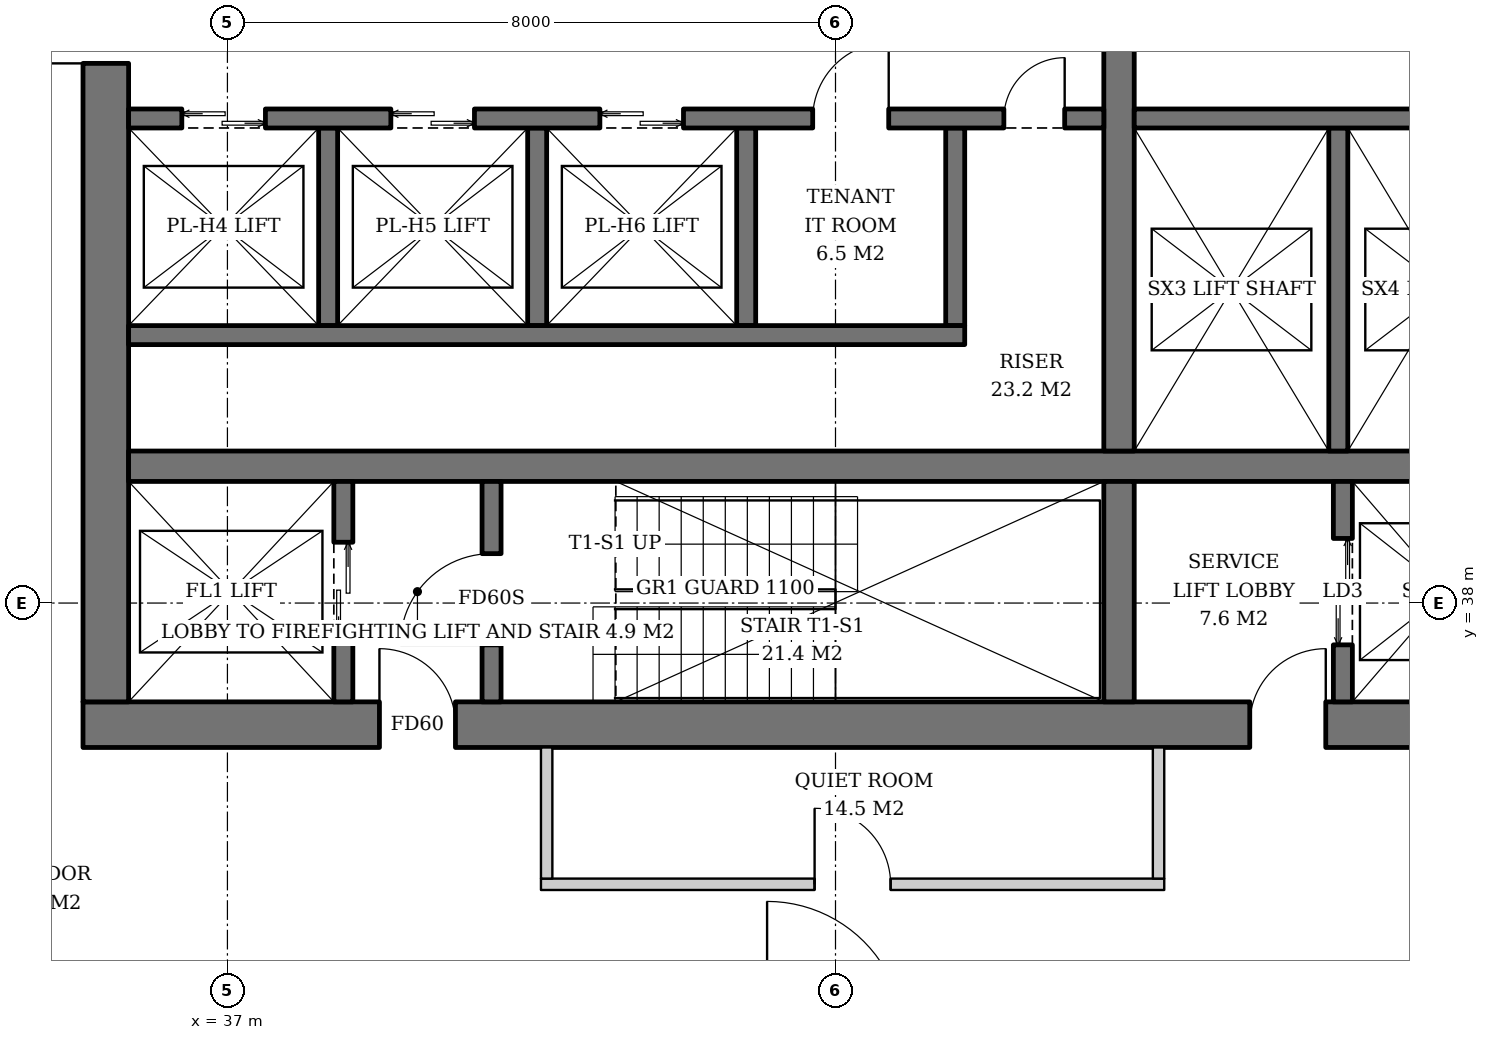
"""IFC4 building model, lengths in metres.
Left out: names, types, materials, properties, quantities, classifications, styles, units other than length and angle.
Written with IfcOpenShell. Run it as: python <this file> out.ifc"""

import sys

from ifc_helpers import new_model, si_unit, direction, frame, frame_2d, origin, place, context, subcontext, project, spatial, rectangle, extrude, element, fill, save


model = new_model("IFC4")
c1 = context("Model", 3, precision=1e-05, world=origin(), true_north=direction((0.0, 1.0)))
c2 = subcontext(c1, "Body", "Model", "MODEL_VIEW")
j1 = project(units=[si_unit("LENGTHUNIT", "METRE"), si_unit("PLANEANGLEUNIT", "RADIAN")], contexts=[c1])
p1 = place(None, origin())
s1 = spatial("IfcSite", under=j1, at=p1, CompositionType="ELEMENT")
p2 = place(p1, origin())
s2 = spatial("IfcBuilding", under=s1, at=p2, CompositionType="ELEMENT")
p3 = place(p2, frame((0.0, 0.0, 222.4)))
s3 = spatial("IfcBuildingStorey", under=s2, at=p3, CompositionType="ELEMENT", Elevation=222.4)
p4 = place(p3, frame((35.1, 36.4, 0.0), z_axis=(0.0, 0.0, 1.0), x_axis=(1.0, 0.0, 0.0)))
e1 = element("IfcWall", 1, at=p4, inside=s3, PredefinedType="SHEAR", context=c2, shape_type="SweptSolid", body=[
    extrude(rectangle(XDim=19.8, YDim=0.6, at=frame_2d((9.9, 0.0))), origin(), (0.0, 0.0, 1.0), 3.8),
])
p5 = place(p4, frame((3.9, 0.0, 0.0)))
e2 = element("IfcOpeningElement", 2, at=p5, cuts=e1, PredefinedType="OPENING", context=c2, shape_type="SweptSolid", body=[
    extrude(rectangle(XDim=1.0, YDim=2.1, at=frame_2d((0.5, 1.05))), frame((0.0, 0.31, 0.0), z_axis=(0.0, -1.0, 0.0), x_axis=(1.0, 0.0, 0.0)), (0.0, 0.0, 1.0), 0.62),
])
p6 = place(p4, frame((15.35, 0.0, 0.0)))
e3 = element("IfcOpeningElement", 3, at=p6, cuts=e1, PredefinedType="OPENING", context=c2, shape_type="SweptSolid", body=[
    extrude(rectangle(XDim=1.0, YDim=2.1, at=frame_2d((0.5, 1.05))), frame((0.0, 0.31, 0.0), z_axis=(0.0, -1.0, 0.0), x_axis=(1.0, 0.0, 0.0)), (0.0, 0.0, 1.0), 0.62),
])
p7 = place(p3, frame((35.4, 36.7, 0.0), z_axis=(0.0, 0.0, 1.0), x_axis=(0.0, 1.0, 0.0)))
e4 = element("IfcWall", 4, at=p7, inside=s3, PredefinedType="SHEAR", context=c2, shape_type="SweptSolid", body=[
    extrude(rectangle(XDim=18.6, YDim=0.6, at=frame_2d((9.3, 0.0))), origin(), (0.0, 0.0, 1.0), 3.8),
])
p8 = place(p7, frame((8.4, 0.0, 0.0)))
e5 = element("IfcOpeningElement", 5, at=p8, cuts=e4, PredefinedType="OPENING", context=c2, shape_type="SweptSolid", body=[
    extrude(rectangle(XDim=1.8, YDim=2.4, at=frame_2d((0.9, 1.2))), frame((0.0, 0.31, 0.0), z_axis=(0.0, -1.0, 0.0), x_axis=(1.0, 0.0, 0.0)), (0.0, 0.0, 1.0), 0.62),
])
p9 = place(p3, frame((35.7, 39.8, 0.0), z_axis=(0.0, 0.0, 1.0), x_axis=(1.0, 0.0, 0.0)))
e6 = element("IfcWall", 6, at=p9, inside=s3, PredefinedType="SHEAR", context=c2, shape_type="SweptSolid", body=[
    extrude(rectangle(XDim=18.6, YDim=0.4, at=frame_2d((9.3, 0.0))), origin(), (0.0, 0.0, 1.0), 3.8),
])
p10 = place(p3, frame((48.73, 36.7, 0.0), z_axis=(0.0, 0.0, 1.0), x_axis=(0.0, 1.0, 0.0)))
e7 = element("IfcWall", 7, at=p10, inside=s3, PredefinedType="SHEAR", context=c2, shape_type="SweptSolid", body=[
    extrude(rectangle(XDim=2.9, YDim=0.4, at=frame_2d((1.45, 0.0))), origin(), (0.0, 0.0, 1.0), 3.8),
])
p11 = place(p3, frame((48.73, 40.0, 0.0), z_axis=(0.0, 0.0, 1.0), x_axis=(0.0, 1.0, 0.0)))
e8 = element("IfcWall", 8, at=p11, inside=s3, PredefinedType="SHEAR", context=c2, shape_type="SweptSolid", body=[
    extrude(rectangle(XDim=12.0, YDim=0.4, at=frame_2d((6.0, 0.0))), origin(), (0.0, 0.0, 1.0), 3.8),
])
p12 = place(p3, frame((38.525, 36.7, 0.0), z_axis=(0.0, 0.0, 1.0), x_axis=(0.0, 1.0, 0.0)))
e9 = element("IfcWall", 9, at=p12, inside=s3, PredefinedType="SHEAR", context=c2, shape_type="SweptSolid", body=[
    extrude(rectangle(XDim=2.9, YDim=0.25, at=frame_2d((1.45, 0.0))), origin(), (0.0, 0.0, 1.0), 3.8),
])
p13 = place(p12, frame((0.8, 0.0, 0.0)))
e10 = element("IfcOpeningElement", 10, at=p13, cuts=e9, PredefinedType="OPENING", context=c2, shape_type="SweptSolid", body=[
    extrude(rectangle(XDim=1.3, YDim=2.2, at=frame_2d((0.65, 1.1))), frame((0.0, 0.135, 0.0), z_axis=(0.0, -1.0, 0.0), x_axis=(1.0, 0.0, 0.0)), (0.0, 0.0, 1.0), 0.27),
])
p14 = place(p3, frame((40.475, 36.7, 0.0), z_axis=(0.0, 0.0, 1.0), x_axis=(0.0, 1.0, 0.0)))
e11 = element("IfcWall", 11, at=p14, inside=s3, PredefinedType="SHEAR", context=c2, shape_type="SweptSolid", body=[
    extrude(rectangle(XDim=2.9, YDim=0.25, at=frame_2d((1.45, 0.0))), origin(), (0.0, 0.0, 1.0), 3.8),
])
p15 = place(p14, frame((0.75, 0.0, 0.0)))
e12 = element("IfcOpeningElement", 12, at=p15, cuts=e11, PredefinedType="OPENING", context=c2, shape_type="SweptSolid", body=[
    extrude(rectangle(XDim=1.2, YDim=2.1, at=frame_2d((0.6, 1.05))), frame((0.0, 0.135, 0.0), z_axis=(0.0, -1.0, 0.0), x_axis=(1.0, 0.0, 0.0)), (0.0, 0.0, 1.0), 0.27),
])
p16 = place(p3, frame((51.675, 36.7, 0.0), z_axis=(0.0, 0.0, 1.0), x_axis=(0.0, 1.0, 0.0)))
e13 = element("IfcWall", 13, at=p16, inside=s3, PredefinedType="SHEAR", context=c2, shape_type="SweptSolid", body=[
    extrude(rectangle(XDim=2.9, YDim=0.25, at=frame_2d((1.45, 0.0))), origin(), (0.0, 0.0, 1.0), 3.8),
])
p17 = place(p16, frame((0.75, 0.0, 0.0)))
e14 = element("IfcOpeningElement", 14, at=p17, cuts=e13, PredefinedType="OPENING", context=c2, shape_type="SweptSolid", body=[
    extrude(rectangle(XDim=1.4, YDim=2.4, at=frame_2d((0.7, 1.2))), frame((0.0, 0.135, 0.0), z_axis=(0.0, -1.0, 0.0), x_axis=(1.0, 0.0, 0.0)), (0.0, 0.0, 1.0), 0.27),
])
for number, where, z_axis, x_axis in (
    (15, (38.325, 44.25, 0.0), (0.0, 0.0, 1.0), (0.0, -1.0, 0.0)),
    (16, (41.075, 44.25, 0.0), (0.0, 0.0, 1.0), (0.0, -1.0, 0.0)),
    (17, (43.825, 44.25, 0.0), (0.0, 0.0, 1.0), (0.0, -1.0, 0.0)),
    (18, (46.575, 44.25, 0.0), (0.0, 0.0, 1.0), (0.0, -1.0, 0.0)),
):
    element("IfcWall", number, at=place(p3, frame(where, z_axis=z_axis, x_axis=x_axis)), inside=s3, PredefinedType="SHEAR", context=c2, shape_type="SweptSolid", body=[
        extrude(rectangle(XDim=2.6, YDim=0.25, at=frame_2d((1.3, 0.0))), origin(), (0.0, 0.0, 1.0), 3.8),
    ])
p18 = place(p3, frame((35.7, 41.525, 0.0), z_axis=(0.0, 0.0, 1.0), x_axis=(1.0, 0.0, 0.0)))
e19 = element("IfcWall", 19, at=p18, inside=s3, PredefinedType="SHEAR", context=c2, shape_type="SweptSolid", body=[
    extrude(rectangle(XDim=11.0, YDim=0.25, at=frame_2d((5.5, 0.0))), origin(), (0.0, 0.0, 1.0), 3.8),
])
p19 = place(p3, frame((35.7, 44.375, 0.0), z_axis=(0.0, 0.0, 1.0), x_axis=(1.0, 0.0, 0.0)))
e20 = element("IfcWall", 20, at=p19, inside=s3, PredefinedType="SHEAR", context=c2, shape_type="SweptSolid", body=[
    extrude(rectangle(XDim=12.83, YDim=0.25, at=frame_2d((6.415, 0.0))), origin(), (0.0, 0.0, 1.0), 3.8),
])
p20 = place(p19, frame((0.7, 0.0, 0.0)))
e21 = element("IfcOpeningElement", 21, at=p20, cuts=e20, PredefinedType="OPENING", context=c2, shape_type="SweptSolid", body=[
    extrude(rectangle(XDim=1.1, YDim=2.2, at=frame_2d((0.55, 1.1))), frame((0.0, 0.135, 0.0), z_axis=(0.0, -1.0, 0.0), x_axis=(1.0, 0.0, 0.0)), (0.0, 0.0, 1.0), 0.27),
])
p21 = place(p19, frame((3.45, 0.0, 0.0)))
e22 = element("IfcOpeningElement", 22, at=p21, cuts=e20, PredefinedType="OPENING", context=c2, shape_type="SweptSolid", body=[
    extrude(rectangle(XDim=1.1, YDim=2.2, at=frame_2d((0.55, 1.1))), frame((0.0, 0.135, 0.0), z_axis=(0.0, -1.0, 0.0), x_axis=(1.0, 0.0, 0.0)), (0.0, 0.0, 1.0), 0.27),
])
p22 = place(p19, frame((6.2, 0.0, 0.0)))
e23 = element("IfcOpeningElement", 23, at=p22, cuts=e20, PredefinedType="OPENING", context=c2, shape_type="SweptSolid", body=[
    extrude(rectangle(XDim=1.1, YDim=2.2, at=frame_2d((0.55, 1.1))), frame((0.0, 0.135, 0.0), z_axis=(0.0, -1.0, 0.0), x_axis=(1.0, 0.0, 0.0)), (0.0, 0.0, 1.0), 0.27),
])
p23 = place(p19, frame((9.0, 0.0, 0.0)))
e24 = element("IfcOpeningElement", 24, at=p23, cuts=e20, PredefinedType="OPENING", context=c2, shape_type="SweptSolid", body=[
    extrude(rectangle(XDim=1.0, YDim=2.1, at=frame_2d((0.5, 1.05))), frame((0.0, 0.135, 0.0), z_axis=(0.0, -1.0, 0.0), x_axis=(1.0, 0.0, 0.0)), (0.0, 0.0, 1.0), 0.27),
])
p24 = place(p19, frame((11.515, 0.0, 0.0)))
e25 = element("IfcOpeningElement", 25, at=p24, cuts=e20, PredefinedType="OPENING", context=c2, shape_type="SweptSolid", body=[
    extrude(rectangle(XDim=0.8, YDim=2.0, at=frame_2d((0.4, 1.0))), frame((0.0, 0.135, 0.0), z_axis=(0.0, -1.0, 0.0), x_axis=(1.0, 0.0, 0.0)), (0.0, 0.0, 1.0), 0.27),
])
p25 = place(p3, frame((51.615, 44.25, 0.0), z_axis=(0.0, 0.0, 1.0), x_axis=(0.0, -1.0, 0.0)))
e26 = element("IfcWall", 26, at=p25, inside=s3, PredefinedType="SHEAR", context=c2, shape_type="SweptSolid", body=[
    extrude(rectangle(XDim=4.25, YDim=0.25, at=frame_2d((2.125, 0.0))), origin(), (0.0, 0.0, 1.0), 3.8),
])
p26 = place(p3, frame((48.93, 44.375, 0.0), z_axis=(0.0, 0.0, 1.0), x_axis=(1.0, 0.0, 0.0)))
e27 = element("IfcWall", 27, at=p26, inside=s3, PredefinedType="SHEAR", context=c2, shape_type="SweptSolid", body=[
    extrude(rectangle(XDim=5.37, YDim=0.25, at=frame_2d((2.685, 0.0))), origin(), (0.0, 0.0, 1.0), 3.8),
])
p27 = place(p3, frame((41.125, 34.3, 0.0), z_axis=(0.0, 0.0, 1.0), x_axis=(1.0, 0.0, 0.0)))
e28 = element("IfcWall", 28, at=p27, inside=s3, PredefinedType="PARTITIONING", context=c2, shape_type="SweptSolid", body=[
    extrude(rectangle(XDim=8.2, YDim=0.15, at=frame_2d((4.1, 0.0))), origin(), (0.0, 0.0, 1.0), 2.706),
])
p28 = place(p27, frame((3.6, 0.0, 0.0)))
e29 = element("IfcOpeningElement", 29, at=p28, cuts=e28, PredefinedType="OPENING", context=c2, shape_type="SweptSolid", body=[
    extrude(rectangle(XDim=1.0, YDim=2.1, at=frame_2d((0.5, 1.05))), frame((0.0, 0.085, 0.0), z_axis=(0.0, -1.0, 0.0), x_axis=(1.0, 0.0, 0.0)), (0.0, 0.0, 1.0), 0.17),
])
for number, where, z_axis, x_axis in (
    (30, (41.2, 36.1, 0.0), (0.0, 0.0, 1.0), (0.0, -1.0, 0.0)),
    (31, (49.25, 36.1, 0.0), (0.0, 0.0, 1.0), (0.0, -1.0, 0.0)),
):
    element("IfcWall", number, at=place(p3, frame(where, z_axis=z_axis, x_axis=x_axis)), inside=s3, PredefinedType="PARTITIONING", context=c2, shape_type="SweptSolid", body=[
        extrude(rectangle(XDim=1.725, YDim=0.15, at=frame_2d((0.863, 0.0))), origin(), (0.0, 0.0, 1.0), 3.52),
    ])
p29 = place(p13, origin())
e32 = element("IfcDoor", 32, at=p29, inside=s3, OperationType="DOUBLE_DOOR_SLIDING", PredefinedType="DOOR", context=c2, shape_type="SweptSolid", body=[
    extrude(rectangle(XDim=1.3, YDim=2.2, at=frame_2d((0.65, 1.1))), frame((0.0, 0.025, 0.0), z_axis=(0.0, -1.0, 0.0), x_axis=(1.0, 0.0, 0.0)), (0.0, 0.0, 1.0), 0.05),
])
fill(e10, e32)
p30 = place(p15, origin())
e33 = element("IfcDoor", 33, at=p30, inside=s3, OperationType="SINGLE_SWING_LEFT", PredefinedType="DOOR", context=c2, shape_type="SweptSolid", body=[
    extrude(rectangle(XDim=1.2, YDim=2.1, at=frame_2d((0.6, 1.05))), frame((0.0, 0.025, 0.0), z_axis=(0.0, -1.0, 0.0), x_axis=(1.0, 0.0, 0.0)), (0.0, 0.0, 1.0), 0.05),
])
fill(e12, e33)
p31 = place(p17, origin())
e34 = element("IfcDoor", 34, at=p31, inside=s3, OperationType="DOUBLE_DOOR_SLIDING", PredefinedType="DOOR", context=c2, shape_type="SweptSolid", body=[
    extrude(rectangle(XDim=1.4, YDim=2.4, at=frame_2d((0.7, 1.2))), frame((0.0, 0.025, 0.0), z_axis=(0.0, -1.0, 0.0), x_axis=(1.0, 0.0, 0.0)), (0.0, 0.0, 1.0), 0.05),
])
fill(e14, e34)
p32 = place(p20, origin())
e35 = element("IfcDoor", 35, at=p32, inside=s3, OperationType="DOUBLE_DOOR_SLIDING", PredefinedType="DOOR", context=c2, shape_type="SweptSolid", body=[
    extrude(rectangle(XDim=1.1, YDim=2.2, at=frame_2d((0.55, 1.1))), frame((0.0, 0.025, 0.0), z_axis=(0.0, -1.0, 0.0), x_axis=(1.0, 0.0, 0.0)), (0.0, 0.0, 1.0), 0.05),
])
fill(e21, e35)
p33 = place(p21, origin())
e36 = element("IfcDoor", 36, at=p33, inside=s3, OperationType="DOUBLE_DOOR_SLIDING", PredefinedType="DOOR", context=c2, shape_type="SweptSolid", body=[
    extrude(rectangle(XDim=1.1, YDim=2.2, at=frame_2d((0.55, 1.1))), frame((0.0, 0.025, 0.0), z_axis=(0.0, -1.0, 0.0), x_axis=(1.0, 0.0, 0.0)), (0.0, 0.0, 1.0), 0.05),
])
fill(e22, e36)
p34 = place(p22, origin())
e37 = element("IfcDoor", 37, at=p34, inside=s3, OperationType="DOUBLE_DOOR_SLIDING", PredefinedType="DOOR", context=c2, shape_type="SweptSolid", body=[
    extrude(rectangle(XDim=1.1, YDim=2.2, at=frame_2d((0.55, 1.1))), frame((0.0, 0.025, 0.0), z_axis=(0.0, -1.0, 0.0), x_axis=(1.0, 0.0, 0.0)), (0.0, 0.0, 1.0), 0.05),
])
fill(e23, e37)
p35 = place(p23, origin())
e38 = element("IfcDoor", 38, at=p35, inside=s3, OperationType="SINGLE_SWING_RIGHT", PredefinedType="DOOR", context=c2, shape_type="SweptSolid", body=[
    extrude(rectangle(XDim=1.0, YDim=2.1, at=frame_2d((0.5, 1.05))), frame((0.0, 0.025, 0.0), z_axis=(0.0, -1.0, 0.0), x_axis=(1.0, 0.0, 0.0)), (0.0, 0.0, 1.0), 0.05),
])
fill(e24, e38)
p36 = place(p24, origin())
e39 = element("IfcDoor", 39, at=p36, inside=s3, OperationType="SINGLE_SWING_RIGHT", PredefinedType="DOOR", context=c2, shape_type="SweptSolid", body=[
    extrude(rectangle(XDim=0.8, YDim=2.0, at=frame_2d((0.4, 1.0))), frame((0.0, 0.025, 0.0), z_axis=(0.0, -1.0, 0.0), x_axis=(1.0, 0.0, 0.0)), (0.0, 0.0, 1.0), 0.05),
])
fill(e25, e39)
p37 = place(p5, origin())
e40 = element("IfcDoor", 40, at=p37, inside=s3, OperationType="SINGLE_SWING_LEFT", PredefinedType="DOOR", context=c2, shape_type="SweptSolid", body=[
    extrude(rectangle(XDim=1.0, YDim=2.1, at=frame_2d((0.5, 1.05))), frame((0.0, 0.025, 0.0), z_axis=(0.0, -1.0, 0.0), x_axis=(1.0, 0.0, 0.0)), (0.0, 0.0, 1.0), 0.05),
])
fill(e2, e40)
p38 = place(p8, origin())
e41 = element("IfcDoor", 41, at=p38, inside=s3, OperationType="DOUBLE_DOOR_SINGLE_SWING", PredefinedType="DOOR", context=c2, shape_type="SweptSolid", body=[
    extrude(rectangle(XDim=1.8, YDim=2.4, at=frame_2d((0.9, 1.2))), frame((0.0, 0.025, 0.0), z_axis=(0.0, -1.0, 0.0), x_axis=(1.0, 0.0, 0.0)), (0.0, 0.0, 1.0), 0.05),
])
fill(e5, e41)
p39 = place(p6, origin())
e42 = element("IfcDoor", 42, at=p39, inside=s3, OperationType="SINGLE_SWING_RIGHT", PredefinedType="DOOR", context=c2, shape_type="SweptSolid", body=[
    extrude(rectangle(XDim=1.0, YDim=2.1, at=frame_2d((0.5, 1.05))), frame((0.0, 0.025, 0.0), z_axis=(0.0, -1.0, 0.0), x_axis=(1.0, 0.0, 0.0)), (0.0, 0.0, 1.0), 0.05),
])
fill(e3, e42)
p40 = place(p28, origin())
e43 = element("IfcDoor", 43, at=p40, inside=s3, OperationType="SINGLE_SWING_LEFT", PredefinedType="DOOR", context=c2, shape_type="SweptSolid", body=[
    extrude(rectangle(XDim=1.0, YDim=2.1, at=frame_2d((0.5, 1.05))), frame((0.0, 0.025, 0.0), z_axis=(0.0, -1.0, 0.0), x_axis=(1.0, 0.0, 0.0)), (0.0, 0.0, 1.0), 0.05),
])
fill(e29, e43)
save(model, sys.argv[1])
